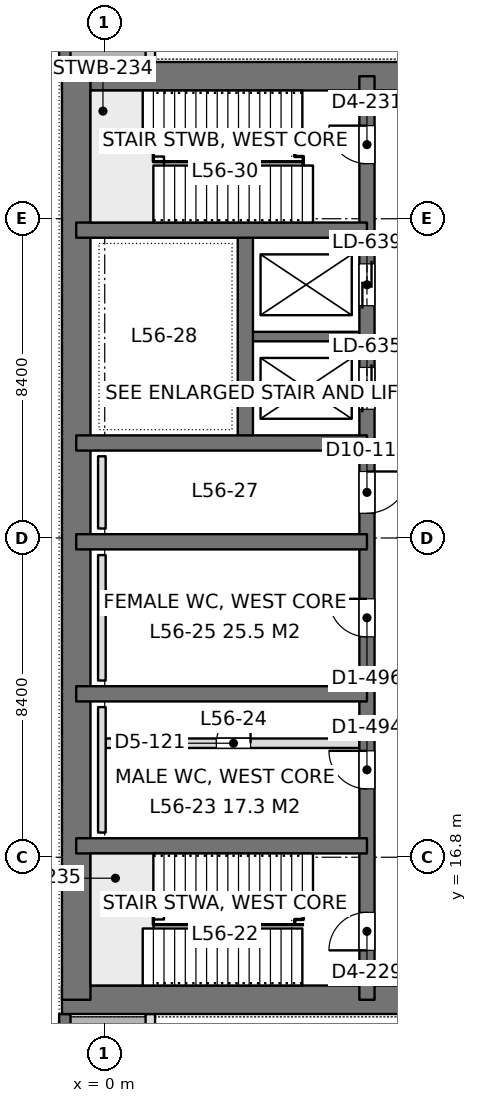
"""IFC4 building model, lengths in metres.
Left out: names, types, materials, properties, quantities, classifications, styles, units other than length and angle.
Written with IfcOpenShell. Run it as: python <this file> out.ifc"""

import sys

from ifc_helpers import new_model, si_unit, direction, frame, frame_2d, origin, place, context, subcontext, project, spatial, rectangle, extrude, element, fill, save


model = new_model("IFC4")
c1 = context("Model", 3, precision=1e-05, world=origin(), true_north=direction((0.0, 1.0)))
c2 = subcontext(c1, "Body", "Model", "MODEL_VIEW")
j1 = project(units=[si_unit("LENGTHUNIT", "METRE"), si_unit("PLANEANGLEUNIT", "RADIAN")], contexts=[c1])
p1 = place(None, origin())
s1 = spatial("IfcSite", under=j1, at=p1, CompositionType="ELEMENT")
p2 = place(p1, origin())
s2 = spatial("IfcBuilding", under=s1, at=p2, CompositionType="ELEMENT")
p3 = place(p2, frame((0.0, 0.0, 244.8)))
s3 = spatial("IfcBuildingStorey", under=s2, at=p3, CompositionType="ELEMENT", Elevation=244.8)
p4 = place(p3, frame((-1.125, 13.05, 0.0), z_axis=(0.0, 0.0, 1.0), x_axis=(1.0, 0.0, 0.0)))
e1 = element("IfcWall", 1, at=p4, inside=s3, PredefinedType="SHEAR", context=c2, shape_type="SweptSolid", body=[
    extrude(rectangle(XDim=17.85, YDim=0.75, at=frame_2d((8.925, 0.0))), origin(), (0.0, 0.0, 1.0), 5.4),
])
p5 = place(p4, frame((8.875, 0.0, 0.0)))
e2 = element("IfcOpeningElement", 2, at=p5, cuts=e1, PredefinedType="OPENING", context=c2, shape_type="SweptSolid", body=[
    extrude(rectangle(XDim=1.8, YDim=2.4, at=frame_2d((0.9, 1.2))), frame((0.0, 0.385, 0.0), z_axis=(0.0, -1.0, 0.0), x_axis=(1.0, 0.0, 0.0)), (0.0, 0.0, 1.0), 0.77),
])
p6 = place(p3, frame((-1.125, 37.35, 0.0), z_axis=(0.0, 0.0, 1.0), x_axis=(1.0, 0.0, 0.0)))
e3 = element("IfcWall", 3, at=p6, inside=s3, PredefinedType="SHEAR", context=c2, shape_type="SweptSolid", body=[
    extrude(rectangle(XDim=17.85, YDim=0.75, at=frame_2d((8.925, 0.0))), origin(), (0.0, 0.0, 1.0), 5.4),
])
p7 = place(p6, frame((8.875, 0.0, 0.0)))
e4 = element("IfcOpeningElement", 4, at=p7, cuts=e3, PredefinedType="OPENING", context=c2, shape_type="SweptSolid", body=[
    extrude(rectangle(XDim=1.8, YDim=2.4, at=frame_2d((0.9, 1.2))), frame((0.0, 0.385, 0.0), z_axis=(0.0, -1.0, 0.0), x_axis=(1.0, 0.0, 0.0)), (0.0, 0.0, 1.0), 0.77),
])
p8 = place(p3, frame((-0.75, 13.05, 0.0), z_axis=(0.0, 0.0, 1.0), x_axis=(0.0, 1.0, 0.0)))
e5 = element("IfcWall", 5, at=p8, inside=s3, PredefinedType="SHEAR", context=c2, shape_type="SweptSolid", body=[
    extrude(rectangle(XDim=24.3, YDim=0.75, at=frame_2d((12.15, 0.0))), origin(), (0.0, 0.0, 1.0), 5.4),
])
p9 = place(p3, frame((6.9, 13.05, 0.0), z_axis=(0.0, 0.0, 1.0), x_axis=(0.0, 1.0, 0.0)))
e6 = element("IfcWall", 6, at=p9, inside=s3, PredefinedType="SHEAR", context=c2, shape_type="SweptSolid", body=[
    extrude(rectangle(XDim=24.3, YDim=0.4, at=frame_2d((12.15, 0.0))), origin(), (0.0, 0.0, 1.0), 5.4),
])
p10 = place(p9, frame((1.3, 0.0, 0.0)))
e7 = element("IfcOpeningElement", 7, at=p10, cuts=e6, PredefinedType="OPENING", context=c2, shape_type="SweptSolid", body=[
    extrude(rectangle(XDim=1.0, YDim=2.2, at=frame_2d((0.5, 1.1))), frame((0.0, 0.21, 0.0), z_axis=(0.0, -1.0, 0.0), x_axis=(1.0, 0.0, 0.0)), (0.0, 0.0, 1.0), 0.42),
])
p11 = place(p9, frame((22.0, 0.0, 0.0)))
e8 = element("IfcOpeningElement", 8, at=p11, cuts=e6, PredefinedType="OPENING", context=c2, shape_type="SweptSolid", body=[
    extrude(rectangle(XDim=1.0, YDim=2.2, at=frame_2d((0.5, 1.1))), frame((0.0, 0.21, 0.0), z_axis=(0.0, -1.0, 0.0), x_axis=(1.0, 0.0, 0.0)), (0.0, 0.0, 1.0), 0.42),
])
p12 = place(p9, frame((5.55, 0.0, 0.0)))
e9 = element("IfcOpeningElement", 9, at=p12, cuts=e6, PredefinedType="OPENING", context=c2, shape_type="SweptSolid", body=[
    extrude(rectangle(XDim=1.0, YDim=2.2, at=frame_2d((0.5, 1.1))), frame((0.0, 0.21, 0.0), z_axis=(0.0, -1.0, 0.0), x_axis=(1.0, 0.0, 0.0)), (0.0, 0.0, 1.0), 0.42),
])
p13 = place(p9, frame((9.55, 0.0, 0.0)))
e10 = element("IfcOpeningElement", 10, at=p13, cuts=e6, PredefinedType="OPENING", context=c2, shape_type="SweptSolid", body=[
    extrude(rectangle(XDim=1.0, YDim=2.2, at=frame_2d((0.5, 1.1))), frame((0.0, 0.21, 0.0), z_axis=(0.0, -1.0, 0.0), x_axis=(1.0, 0.0, 0.0)), (0.0, 0.0, 1.0), 0.42),
])
p14 = place(p9, frame((12.8, 0.0, 0.0)))
e11 = element("IfcOpeningElement", 11, at=p14, cuts=e6, PredefinedType="OPENING", context=c2, shape_type="SweptSolid", body=[
    extrude(rectangle(XDim=1.1, YDim=2.2, at=frame_2d((0.55, 1.1))), frame((0.0, 0.21, 0.0), z_axis=(0.0, -1.0, 0.0), x_axis=(1.0, 0.0, 0.0)), (0.0, 0.0, 1.0), 0.42),
])
p15 = place(p9, frame((15.538, 0.0, 0.0)))
e12 = element("IfcOpeningElement", 12, at=p15, cuts=e6, PredefinedType="OPENING", context=c2, shape_type="SweptSolid", body=[
    extrude(rectangle(XDim=1.1, YDim=2.2, at=frame_2d((0.55, 1.1))), frame((0.0, 0.21, 0.0), z_axis=(0.0, -1.0, 0.0), x_axis=(1.0, 0.0, 0.0)), (0.0, 0.0, 1.0), 0.42),
])
p16 = place(p9, frame((18.262, 0.0, 0.0)))
e13 = element("IfcOpeningElement", 13, at=p16, cuts=e6, PredefinedType="OPENING", context=c2, shape_type="SweptSolid", body=[
    extrude(rectangle(XDim=1.1, YDim=2.2, at=frame_2d((0.55, 1.1))), frame((0.0, 0.21, 0.0), z_axis=(0.0, -1.0, 0.0), x_axis=(1.0, 0.0, 0.0)), (0.0, 0.0, 1.0), 0.42),
])
for number, where, z_axis, x_axis in (
    (14, (-0.75, 17.1, 0.0), (0.0, 0.0, 1.0), (1.0, 0.0, 0.0)),
    (15, (-0.75, 21.1, 0.0), (0.0, 0.0, 1.0), (1.0, 0.0, 0.0)),
    (16, (-0.75, 25.1, 0.0), (0.0, 0.0, 1.0), (1.0, 0.0, 0.0)),
    (17, (-0.75, 27.7, 0.0), (0.0, 0.0, 1.0), (1.0, 0.0, 0.0)),
    (18, (-0.75, 33.3, 0.0), (0.0, 0.0, 1.0), (1.0, 0.0, 0.0)),
):
    element("IfcWall", number, at=place(p3, frame(where, z_axis=z_axis, x_axis=x_axis)), inside=s3, PredefinedType="SHEAR", context=c2, shape_type="SweptSolid", body=[
        extrude(rectangle(XDim=7.65, YDim=0.4, at=frame_2d((3.825, 0.0))), origin(), (0.0, 0.0, 1.0), 5.4),
    ])
p17 = place(p3, frame((3.7, 27.7, 0.0), z_axis=(0.0, 0.0, 1.0), x_axis=(0.0, 1.0, 0.0)))
e19 = element("IfcWall", 19, at=p17, inside=s3, PredefinedType="SHEAR", context=c2, shape_type="SweptSolid", body=[
    extrude(rectangle(XDim=5.6, YDim=0.4, at=frame_2d((2.8, 0.0))), origin(), (0.0, 0.0, 1.0), 5.4),
])
p18 = place(p3, frame((3.7, 30.5, 0.0), z_axis=(0.0, 0.0, 1.0), x_axis=(1.0, 0.0, 0.0)))
e20 = element("IfcWall", 20, at=p18, inside=s3, PredefinedType="SHEAR", context=c2, shape_type="SweptSolid", body=[
    extrude(rectangle(XDim=3.2, YDim=0.25, at=frame_2d((1.6, 0.0))), origin(), (0.0, 0.0, 1.0), 5.4),
])
p19 = place(p3, frame((-1.05, 8.4, 0.0), z_axis=(0.0, 0.0, 1.0), x_axis=(0.0, 1.0, 0.0)))
e21 = element("IfcWall", 21, at=p19, inside=s3, PredefinedType="SOLIDWALL", context=c2, shape_type="SweptSolid", body=[
    extrude(rectangle(XDim=4.275, YDim=0.3, at=frame_2d((2.138, 0.0))), origin(), (0.0, 0.0, 1.0), 5.25),
])
p20 = place(p19, frame((0.938, 0.0, 1.2)))
e22 = element("IfcOpeningElement", 22, at=p20, cuts=e21, PredefinedType="OPENING", context=c2, shape_type="SweptSolid", body=[
    extrude(rectangle(XDim=2.4, YDim=2.4, at=frame_2d((1.2, 1.2))), frame((0.0, 0.16, 0.0), z_axis=(0.0, -1.0, 0.0), x_axis=(1.0, 0.0, 0.0)), (0.0, 0.0, 1.0), 0.32),
])
p21 = place(p3, frame((-1.05, 37.725, 0.0), z_axis=(0.0, 0.0, 1.0), x_axis=(0.0, 1.0, 0.0)))
e23 = element("IfcWall", 23, at=p21, inside=s3, PredefinedType="SOLIDWALL", context=c2, shape_type="SweptSolid", body=[
    extrude(rectangle(XDim=4.275, YDim=0.3, at=frame_2d((2.137, 0.0))), origin(), (0.0, 0.0, 1.0), 5.25),
])
p22 = place(p21, frame((0.938, 0.0, 1.2)))
e24 = element("IfcOpeningElement", 24, at=p22, cuts=e23, PredefinedType="OPENING", context=c2, shape_type="SweptSolid", body=[
    extrude(rectangle(XDim=2.4, YDim=2.4, at=frame_2d((1.2, 1.2))), frame((0.0, 0.16, 0.0), z_axis=(0.0, -1.0, 0.0), x_axis=(1.0, 0.0, 0.0)), (0.0, 0.0, 1.0), 0.32),
])
for number, where, z_axis, x_axis in (
    (25, (1.2, 10.8, 0.0), (0.0, 0.0, 1.0), (0.0, 1.0, 0.0)),
    (26, (1.2, 37.724, 0.0), (0.0, 0.0, 1.0), (0.0, 1.0, 0.0)),
):
    element("IfcWall", number, at=place(p3, frame(where, z_axis=z_axis, x_axis=x_axis)), inside=s3, PredefinedType="PARTITIONING", context=c2, shape_type="SweptSolid", body=[
        extrude(rectangle(XDim=1.876, YDim=0.25, at=frame_2d((0.938, 0.0))), origin(), (0.0, 0.0, 1.0), 5.25),
    ])
p23 = place(p3, frame((0.025, 19.8, 0.0), z_axis=(0.0, 0.0, 1.0), x_axis=(1.0, 0.0, 0.0)))
e27 = element("IfcWall", 27, at=p23, inside=s3, PredefinedType="PARTITIONING", context=c2, shape_type="SweptSolid", body=[
    extrude(rectangle(XDim=6.675, YDim=0.25, at=frame_2d((3.337, 0.0))), origin(), (0.0, 0.0, 1.0), 5.2),
])
p24 = place(p23, frame((2.913, 0.0, 0.0)))
e28 = element("IfcOpeningElement", 28, at=p24, cuts=e27, PredefinedType="OPENING", context=c2, shape_type="SweptSolid", body=[
    extrude(rectangle(XDim=0.9, YDim=2.2, at=frame_2d((0.45, 1.1))), frame((0.0, 0.135, 0.0), z_axis=(0.0, -1.0, 0.0), x_axis=(1.0, 0.0, 0.0)), (0.0, 0.0, 1.0), 0.27),
])
for number, where, z_axis, x_axis in (
    (29, (-0.075, 17.45, 0.0), (0.0, 0.0, 1.0), (0.0, 1.0, 0.0)),
    (30, (-0.075, 21.45, 0.0), (0.0, 0.0, 1.0), (0.0, 1.0, 0.0)),
):
    element("IfcWall", number, at=place(p3, frame(where, z_axis=z_axis, x_axis=x_axis)), inside=s3, PredefinedType="PLUMBINGWALL", context=c2, shape_type="SweptSolid", body=[
        extrude(rectangle(XDim=3.3, YDim=0.2, at=frame_2d((1.65, 0.0))), origin(), (0.0, 0.0, 1.0), 1.2),
    ])
p25 = place(p3, frame((-0.075, 25.45, 0.0), z_axis=(0.0, 0.0, 1.0), x_axis=(0.0, 1.0, 0.0)))
e31 = element("IfcWall", 31, at=p25, inside=s3, PredefinedType="PLUMBINGWALL", context=c2, shape_type="SweptSolid", body=[
    extrude(rectangle(XDim=1.9, YDim=0.2, at=frame_2d((0.95, 0.0))), origin(), (0.0, 0.0, 1.0), 1.2),
])
p26 = place(p10, origin())
e32 = element("IfcDoor", 32, at=p26, inside=s3, OperationType="SINGLE_SWING_LEFT", PredefinedType="DOOR", context=c2, shape_type="SweptSolid", body=[
    extrude(rectangle(XDim=1.0, YDim=2.2, at=frame_2d((0.5, 1.1))), frame((0.0, 0.025, 0.0), z_axis=(0.0, -1.0, 0.0), x_axis=(1.0, 0.0, 0.0)), (0.0, 0.0, 1.0), 0.05),
])
fill(e7, e32)
p27 = place(p11, origin())
e33 = element("IfcDoor", 33, at=p27, inside=s3, OperationType="SINGLE_SWING_RIGHT", PredefinedType="DOOR", context=c2, shape_type="SweptSolid", body=[
    extrude(rectangle(XDim=1.0, YDim=2.2, at=frame_2d((0.5, 1.1))), frame((0.0, 0.025, 0.0), z_axis=(0.0, -1.0, 0.0), x_axis=(1.0, 0.0, 0.0)), (0.0, 0.0, 1.0), 0.05),
])
fill(e8, e33)
p28 = place(p12, origin())
e34 = element("IfcDoor", 34, at=p28, inside=s3, OperationType="SINGLE_SWING_RIGHT", PredefinedType="DOOR", context=c2, shape_type="SweptSolid", body=[
    extrude(rectangle(XDim=1.0, YDim=2.2, at=frame_2d((0.5, 1.1))), frame((0.0, 0.025, 0.0), z_axis=(0.0, -1.0, 0.0), x_axis=(1.0, 0.0, 0.0)), (0.0, 0.0, 1.0), 0.05),
])
fill(e9, e34)
p29 = place(p13, origin())
e35 = element("IfcDoor", 35, at=p29, inside=s3, OperationType="SINGLE_SWING_RIGHT", PredefinedType="DOOR", context=c2, shape_type="SweptSolid", body=[
    extrude(rectangle(XDim=1.0, YDim=2.2, at=frame_2d((0.5, 1.1))), frame((0.0, 0.025, 0.0), z_axis=(0.0, -1.0, 0.0), x_axis=(1.0, 0.0, 0.0)), (0.0, 0.0, 1.0), 0.05),
])
fill(e10, e35)
p30 = place(p14, frame((1.1, 0.0, 0.0), z_axis=(0.0, 0.0, 1.0), x_axis=(-1.0, 0.0, 0.0)))
e36 = element("IfcDoor", 36, at=p30, inside=s3, OperationType="SINGLE_SWING_LEFT", PredefinedType="DOOR", context=c2, shape_type="SweptSolid", body=[
    extrude(rectangle(XDim=1.1, YDim=2.2, at=frame_2d((0.55, 1.1))), frame((0.0, 0.025, 0.0), z_axis=(0.0, -1.0, 0.0), x_axis=(1.0, 0.0, 0.0)), (0.0, 0.0, 1.0), 0.05),
])
fill(e11, e36)
p31 = place(p15, origin())
e37 = element("IfcDoor", 37, at=p31, inside=s3, OperationType="DOUBLE_DOOR_SLIDING", PredefinedType="DOOR", context=c2, shape_type="SweptSolid", body=[
    extrude(rectangle(XDim=1.1, YDim=2.2, at=frame_2d((0.55, 1.1))), frame((0.0, 0.025, 0.0), z_axis=(0.0, -1.0, 0.0), x_axis=(1.0, 0.0, 0.0)), (0.0, 0.0, 1.0), 0.05),
])
fill(e12, e37)
p32 = place(p16, origin())
e38 = element("IfcDoor", 38, at=p32, inside=s3, OperationType="DOUBLE_DOOR_SLIDING", PredefinedType="DOOR", context=c2, shape_type="SweptSolid", body=[
    extrude(rectangle(XDim=1.1, YDim=2.2, at=frame_2d((0.55, 1.1))), frame((0.0, 0.025, 0.0), z_axis=(0.0, -1.0, 0.0), x_axis=(1.0, 0.0, 0.0)), (0.0, 0.0, 1.0), 0.05),
])
fill(e13, e38)
p33 = place(p24, origin())
e39 = element("IfcDoor", 39, at=p33, inside=s3, OperationType="SINGLE_SWING_RIGHT", PredefinedType="DOOR", context=c2, shape_type="SweptSolid", body=[
    extrude(rectangle(XDim=0.9, YDim=2.2, at=frame_2d((0.45, 1.1))), frame((0.0, 0.025, 0.0), z_axis=(0.0, -1.0, 0.0), x_axis=(1.0, 0.0, 0.0)), (0.0, 0.0, 1.0), 0.05),
])
fill(e28, e39)
save(model, sys.argv[1])
